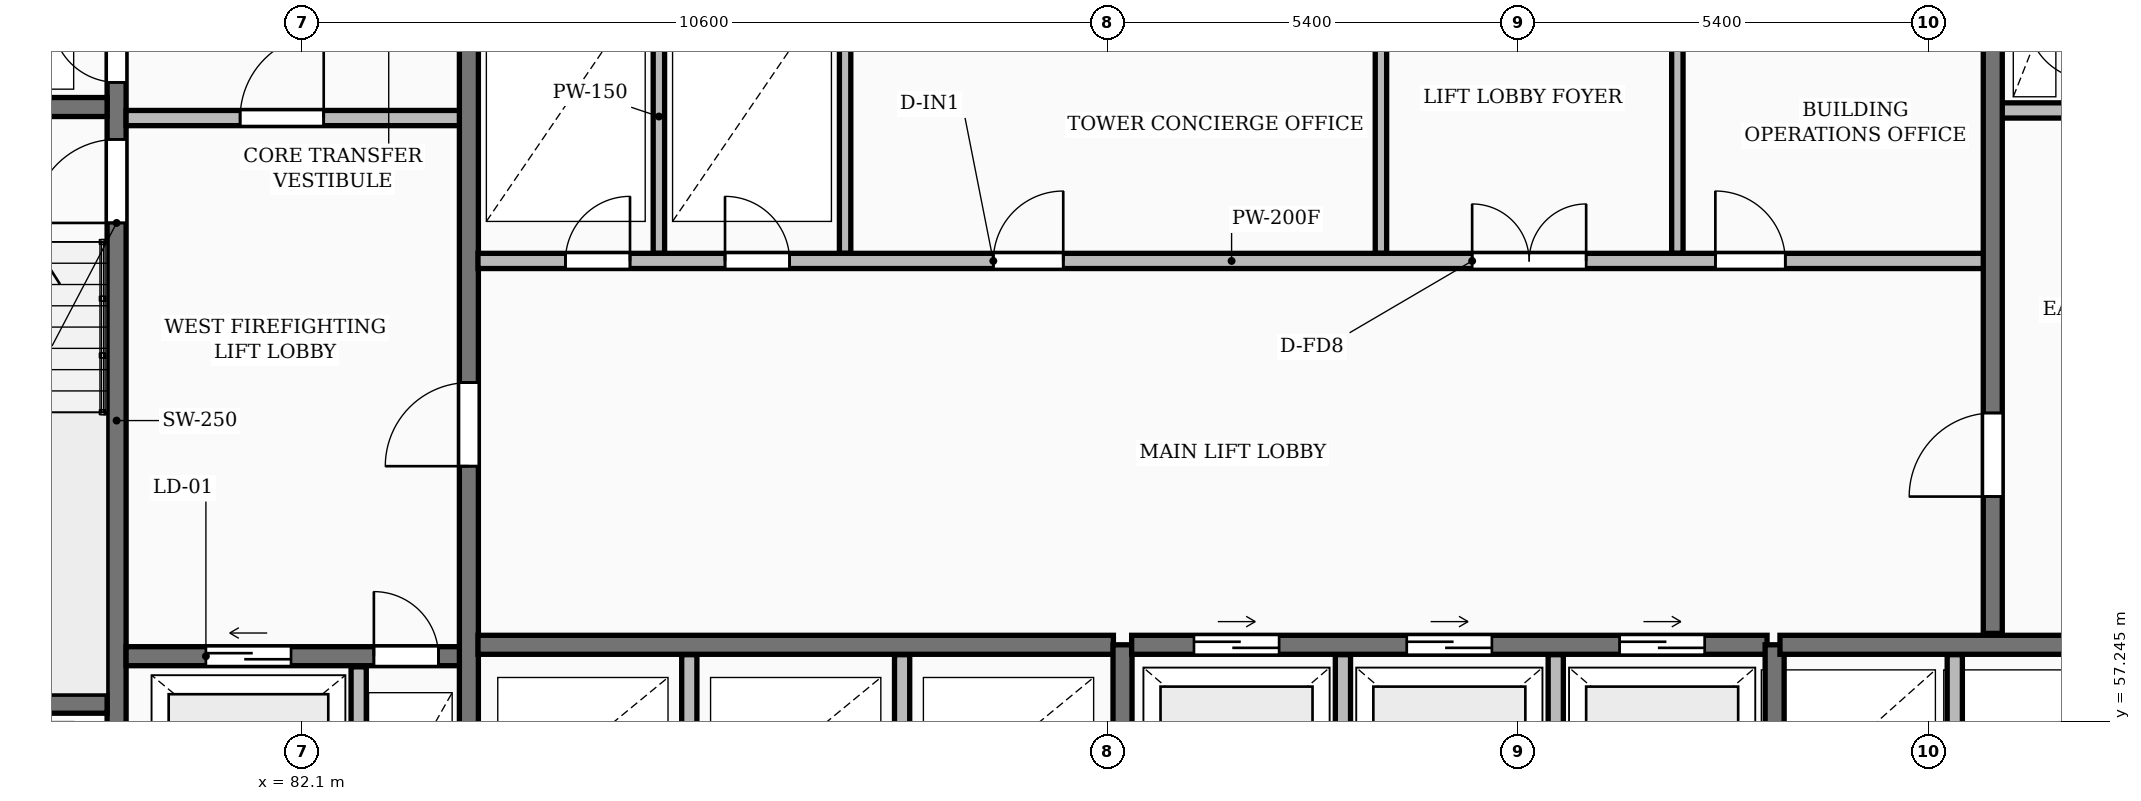
"""IFC4 building model, lengths in metres.
Left out: names, types, materials, properties, quantities, classifications, styles, units other than length and angle.
Written with IfcOpenShell. Run it as: python <this file> out.ifc"""

import sys

from ifc_helpers import new_model, si_unit, direction, frame, frame_2d, origin, place, context, subcontext, project, spatial, rectangle, extrude, element, fill, save


model = new_model("IFC4")
c1 = context("Model", 3, precision=1e-05, world=origin(), true_north=direction((0.0, 1.0)))
c2 = subcontext(c1, "Body", "Model", "MODEL_VIEW")
j1 = project(units=[si_unit("LENGTHUNIT", "METRE"), si_unit("PLANEANGLEUNIT", "RADIAN")], contexts=[c1])
p1 = place(None, origin())
s1 = spatial("IfcSite", under=j1, at=p1, CompositionType="ELEMENT")
p2 = place(p1, origin())
s2 = spatial("IfcBuilding", under=s1, at=p2, CompositionType="ELEMENT")
p3 = place(p2, frame((0.0, 0.0, 97.05)))
s3 = spatial("IfcBuildingStorey", under=s2, at=p3, CompositionType="ELEMENT", Elevation=97.05)
p4 = place(p3, frame((79.665, 55.4, 0.0), z_axis=(0.0, 0.0, 1.0), x_axis=(0.0, 1.0, 0.0)))
e1 = element("IfcWall", 1, at=p4, inside=s3, PredefinedType="SHEAR", context=c2, shape_type="SweptSolid", body=[
    extrude(rectangle(XDim=11.6, YDim=0.25, at=frame_2d((5.8, 0.0))), origin(), (0.0, 0.0, 1.0), 3.25),
])
p5 = place(p4, frame((0.55, 0.0, 0.0)))
e2 = element("IfcOpeningElement", 2, at=p5, cuts=e1, PredefinedType="OPENING", context=c2, shape_type="SweptSolid", body=[
    extrude(rectangle(XDim=0.85, YDim=2.05, at=frame_2d((0.425, 1.025))), frame((0.0, 0.135, 0.0), z_axis=(0.0, -1.0, 0.0), x_axis=(1.0, 0.0, 0.0)), (0.0, 0.0, 1.0), 0.27),
])
p6 = place(p4, frame((8.4, 0.0, 0.0)))
e3 = element("IfcOpeningElement", 3, at=p6, cuts=e1, PredefinedType="OPENING", context=c2, shape_type="SweptSolid", body=[
    extrude(rectangle(XDim=1.1, YDim=2.1, at=frame_2d((0.55, 1.05))), frame((0.0, 0.135, 0.0), z_axis=(0.0, -1.0, 0.0), x_axis=(1.0, 0.0, 0.0)), (0.0, 0.0, 1.0), 0.27),
])
p7 = place(p4, frame((10.25, 0.0, 0.0)))
e4 = element("IfcOpeningElement", 4, at=p7, cuts=e1, PredefinedType="OPENING", context=c2, shape_type="SweptSolid", body=[
    extrude(rectangle(XDim=0.85, YDim=2.05, at=frame_2d((0.425, 1.025))), frame((0.0, 0.135, 0.0), z_axis=(0.0, -1.0, 0.0), x_axis=(1.0, 0.0, 0.0)), (0.0, 0.0, 1.0), 0.27),
])
for number, where, z_axis, x_axis in (
    (5, (76.3, 57.475, 0.0), (0.0, 0.0, 1.0), (1.0, 0.0, 0.0)),
    (6, (76.3, 65.325, 0.0), (0.0, 0.0, 1.0), (1.0, 0.0, 0.0)),
):
    element("IfcWall", number, at=place(p3, frame(where, z_axis=z_axis, x_axis=x_axis)), inside=s3, PredefinedType="SHEAR", context=c2, shape_type="SweptSolid", body=[
        extrude(rectangle(XDim=3.24, YDim=0.25, at=frame_2d((1.62, 0.0))), origin(), (0.0, 0.0, 1.0), 3.25),
    ])
p8 = place(p3, frame((79.79, 58.1, 0.0), z_axis=(0.0, 0.0, 1.0), x_axis=(1.0, 0.0, 0.0)))
e7 = element("IfcWall", 7, at=p8, inside=s3, PredefinedType="SHEAR", context=c2, shape_type="SweptSolid", body=[
    extrude(rectangle(XDim=4.39, YDim=0.25, at=frame_2d((2.195, 0.0))), origin(), (0.0, 0.0, 1.0), 3.25),
])
p9 = place(p8, frame((1.05, 0.0, 0.0)))
e8 = element("IfcOpeningElement", 8, at=p9, cuts=e7, PredefinedType="OPENING", context=c2, shape_type="SweptSolid", body=[
    extrude(rectangle(XDim=1.12, YDim=2.12, at=frame_2d((0.56, 1.06))), frame((0.0, 0.135, 0.0), z_axis=(0.0, -1.0, 0.0), x_axis=(1.0, 0.0, 0.0)), (0.0, 0.0, 1.0), 0.27),
])
p10 = place(p8, frame((3.26, 0.0, 0.0)))
e9 = element("IfcOpeningElement", 9, at=p10, cuts=e7, PredefinedType="OPENING", context=c2, shape_type="SweptSolid", body=[
    extrude(rectangle(XDim=0.85, YDim=2.05, at=frame_2d((0.425, 1.025))), frame((0.0, 0.135, 0.0), z_axis=(0.0, -1.0, 0.0), x_axis=(1.0, 0.0, 0.0)), (0.0, 0.0, 1.0), 0.27),
])
p11 = place(p3, frame((82.85, 55.4, 0.0), z_axis=(0.0, 0.0, 1.0), x_axis=(0.0, 1.0, 0.0)))
e10 = element("IfcWall", 10, at=p11, inside=s3, PredefinedType="PARTITIONING", context=c2, shape_type="SweptSolid", body=[
    extrude(rectangle(XDim=2.56, YDim=0.2, at=frame_2d((1.28, 0.0))), origin(), (0.0, 0.0, 1.0), 2.97),
])
p12 = place(p3, frame((79.79, 65.18, 0.0), z_axis=(0.0, 0.0, 1.0), x_axis=(1.0, 0.0, 0.0)))
e11 = element("IfcWall", 11, at=p12, inside=s3, PredefinedType="PARTITIONING", context=c2, shape_type="SweptSolid", body=[
    extrude(rectangle(XDim=4.39, YDim=0.2, at=frame_2d((2.195, 0.0))), origin(), (0.0, 0.0, 1.0), 2.97),
])
p13 = place(p12, frame((1.5, 0.0, 0.0)))
e12 = element("IfcOpeningElement", 12, at=p13, cuts=e11, PredefinedType="OPENING", context=c2, shape_type="SweptSolid", body=[
    extrude(rectangle(XDim=1.1, YDim=2.1, at=frame_2d((0.55, 1.05))), frame((0.0, 0.11, 0.0), z_axis=(0.0, -1.0, 0.0), x_axis=(1.0, 0.0, 0.0)), (0.0, 0.0, 1.0), 0.22),
])
p14 = place(p3, frame((84.3, 55.4, 0.0), z_axis=(0.0, 0.0, 1.0), x_axis=(0.0, 1.0, 0.0)))
e13 = element("IfcWall", 13, at=p14, inside=s3, PredefinedType="SHEAR", context=c2, shape_type="SweptSolid", body=[
    extrude(rectangle(XDim=11.6, YDim=0.25, at=frame_2d((5.8, 0.0))), origin(), (0.0, 0.0, 1.0), 3.25),
])
p15 = place(p14, frame((5.2, 0.0, 0.0)))
e14 = element("IfcOpeningElement", 14, at=p15, cuts=e13, PredefinedType="OPENING", context=c2, shape_type="SweptSolid", body=[
    extrude(rectangle(XDim=1.1, YDim=2.1, at=frame_2d((0.55, 1.05))), frame((0.0, 0.135, 0.0), z_axis=(0.0, -1.0, 0.0), x_axis=(1.0, 0.0, 0.0)), (0.0, 0.0, 1.0), 0.27),
])
for number, where, z_axis, x_axis in (
    (15, (87.2, 55.4, 0.0), (0.0, 0.0, 1.0), (0.0, 1.0, 0.0)),
    (16, (90.0, 55.4, 0.0), (0.0, 0.0, 1.0), (0.0, 1.0, 0.0)),
):
    element("IfcWall", number, at=place(p3, frame(where, z_axis=z_axis, x_axis=x_axis)), inside=s3, PredefinedType="PARTITIONING", context=c2, shape_type="SweptSolid", body=[
        extrude(rectangle(XDim=2.72, YDim=0.2, at=frame_2d((1.36, 0.0))), origin(), (0.0, 0.0, 1.0), 2.97),
    ])
p16 = place(p3, frame((84.42, 58.25, 0.0), z_axis=(0.0, 0.0, 1.0), x_axis=(1.0, 0.0, 0.0)))
e17 = element("IfcWall", 17, at=p16, inside=s3, PredefinedType="SHEAR", context=c2, shape_type="SweptSolid", body=[
    extrude(rectangle(XDim=8.36, YDim=0.25, at=frame_2d((4.18, 0.0))), origin(), (0.0, 0.0, 1.0), 3.25),
])
p17 = place(p3, frame((92.9, 55.4, 0.0), z_axis=(0.0, 0.0, 1.0), x_axis=(0.0, 1.0, 0.0)))
e18 = element("IfcWall", 18, at=p17, inside=s3, PredefinedType="SHEAR", context=c2, shape_type="SweptSolid", body=[
    extrude(rectangle(XDim=2.85, YDim=0.25, at=frame_2d((1.425, 0.0))), origin(), (0.0, 0.0, 1.0), 3.25),
])
for number, where, z_axis, x_axis in (
    (19, (95.8, 55.4, 0.0), (0.0, 0.0, 1.0), (0.0, 1.0, 0.0)),
    (20, (98.6, 55.4, 0.0), (0.0, 0.0, 1.0), (0.0, 1.0, 0.0)),
):
    element("IfcWall", number, at=place(p3, frame(where, z_axis=z_axis, x_axis=x_axis)), inside=s3, PredefinedType="PARTITIONING", context=c2, shape_type="SweptSolid", body=[
        extrude(rectangle(XDim=2.72, YDim=0.2, at=frame_2d((1.36, 0.0))), origin(), (0.0, 0.0, 1.0), 2.97),
    ])
p18 = place(p3, frame((93.02, 58.25, 0.0), z_axis=(0.0, 0.0, 1.0), x_axis=(1.0, 0.0, 0.0)))
e21 = element("IfcWall", 21, at=p18, inside=s3, PredefinedType="SHEAR", context=c2, shape_type="SweptSolid", body=[
    extrude(rectangle(XDim=8.36, YDim=0.25, at=frame_2d((4.18, 0.0))), origin(), (0.0, 0.0, 1.0), 3.25),
])
p19 = place(p18, frame((0.82, 0.0, 0.0)))
e22 = element("IfcOpeningElement", 22, at=p19, cuts=e21, PredefinedType="OPENING", context=c2, shape_type="SweptSolid", body=[
    extrude(rectangle(XDim=1.12, YDim=2.12, at=frame_2d((0.56, 1.06))), frame((0.0, 0.135, 0.0), z_axis=(0.0, -1.0, 0.0), x_axis=(1.0, 0.0, 0.0)), (0.0, 0.0, 1.0), 0.27),
])
p20 = place(p18, frame((3.62, 0.0, 0.0)))
e23 = element("IfcOpeningElement", 23, at=p20, cuts=e21, PredefinedType="OPENING", context=c2, shape_type="SweptSolid", body=[
    extrude(rectangle(XDim=1.12, YDim=2.12, at=frame_2d((0.56, 1.06))), frame((0.0, 0.135, 0.0), z_axis=(0.0, -1.0, 0.0), x_axis=(1.0, 0.0, 0.0)), (0.0, 0.0, 1.0), 0.27),
])
p21 = place(p18, frame((6.42, 0.0, 0.0)))
e24 = element("IfcOpeningElement", 24, at=p21, cuts=e21, PredefinedType="OPENING", context=c2, shape_type="SweptSolid", body=[
    extrude(rectangle(XDim=1.12, YDim=2.12, at=frame_2d((0.56, 1.06))), frame((0.0, 0.135, 0.0), z_axis=(0.0, -1.0, 0.0), x_axis=(1.0, 0.0, 0.0)), (0.0, 0.0, 1.0), 0.27),
])
p22 = place(p3, frame((101.48, 55.4, 0.0), z_axis=(0.0, 0.0, 1.0), x_axis=(0.0, 1.0, 0.0)))
e25 = element("IfcWall", 25, at=p22, inside=s3, PredefinedType="SHEAR", context=c2, shape_type="SweptSolid", body=[
    extrude(rectangle(XDim=2.85, YDim=0.25, at=frame_2d((1.425, 0.0))), origin(), (0.0, 0.0, 1.0), 3.25),
])
p23 = place(p3, frame((103.85, 55.4, 0.0), z_axis=(0.0, 0.0, 1.0), x_axis=(0.0, 1.0, 0.0)))
e26 = element("IfcWall", 26, at=p23, inside=s3, PredefinedType="PARTITIONING", context=c2, shape_type="SweptSolid", body=[
    extrude(rectangle(XDim=2.72, YDim=0.2, at=frame_2d((1.36, 0.0))), origin(), (0.0, 0.0, 1.0), 2.97),
])
p24 = place(p3, frame((101.55, 58.25, 0.0), z_axis=(0.0, 0.0, 1.0), x_axis=(1.0, 0.0, 0.0)))
e27 = element("IfcWall", 27, at=p24, inside=s3, PredefinedType="SHEAR", context=c2, shape_type="SweptSolid", body=[
    extrude(rectangle(XDim=4.6, YDim=0.25, at=frame_2d((2.3, 0.0))), origin(), (0.0, 0.0, 1.0), 3.25),
])
for number, where, z_axis, x_axis in (
    (28, (86.8, 63.4, 0.0), (0.0, 0.0, 1.0), (0.0, 1.0, 0.0)),
    (29, (89.25, 63.4, 0.0), (0.0, 0.0, 1.0), (0.0, 1.0, 0.0)),
    (30, (96.3, 63.4, 0.0), (0.0, 0.0, 1.0), (0.0, 1.0, 0.0)),
    (31, (100.2, 63.4, 0.0), (0.0, 0.0, 1.0), (0.0, 1.0, 0.0)),
):
    element("IfcWall", number, at=place(p3, frame(where, z_axis=z_axis, x_axis=x_axis)), inside=s3, PredefinedType="PARTITIONING", context=c2, shape_type="SweptSolid", body=[
        extrude(rectangle(XDim=3.6, YDim=0.15, at=frame_2d((1.8, 0.0))), origin(), (0.0, 0.0, 1.0), 2.97),
    ])
p25 = place(p3, frame((84.42, 63.3, 0.0), z_axis=(0.0, 0.0, 1.0), x_axis=(1.0, 0.0, 0.0)))
e32 = element("IfcWall", 32, at=p25, inside=s3, PredefinedType="PARTITIONING", context=c2, shape_type="SweptSolid", body=[
    extrude(rectangle(XDim=19.83, YDim=0.2, at=frame_2d((9.915, 0.0))), origin(), (0.0, 0.0, 1.0), 2.97),
])
p26 = place(p25, frame((1.15, 0.0, 0.0)))
e33 = element("IfcOpeningElement", 33, at=p26, cuts=e32, PredefinedType="OPENING", context=c2, shape_type="SweptSolid", body=[
    extrude(rectangle(XDim=0.85, YDim=2.05, at=frame_2d((0.425, 1.025))), frame((0.0, 0.11, 0.0), z_axis=(0.0, -1.0, 0.0), x_axis=(1.0, 0.0, 0.0)), (0.0, 0.0, 1.0), 0.22),
])
p27 = place(p25, frame((3.25, 0.0, 0.0)))
e34 = element("IfcOpeningElement", 34, at=p27, cuts=e32, PredefinedType="OPENING", context=c2, shape_type="SweptSolid", body=[
    extrude(rectangle(XDim=0.85, YDim=2.05, at=frame_2d((0.425, 1.025))), frame((0.0, 0.11, 0.0), z_axis=(0.0, -1.0, 0.0), x_axis=(1.0, 0.0, 0.0)), (0.0, 0.0, 1.0), 0.22),
])
p28 = place(p25, frame((13.08, 0.0, 0.0)))
e35 = element("IfcOpeningElement", 35, at=p28, cuts=e32, PredefinedType="OPENING", context=c2, shape_type="SweptSolid", body=[
    extrude(rectangle(XDim=1.5, YDim=2.2, at=frame_2d((0.75, 1.1))), frame((0.0, 0.11, 0.0), z_axis=(0.0, -1.0, 0.0), x_axis=(1.0, 0.0, 0.0)), (0.0, 0.0, 1.0), 0.22),
])
p29 = place(p25, frame((6.78, 0.0, 0.0)))
e36 = element("IfcOpeningElement", 36, at=p29, cuts=e32, PredefinedType="OPENING", context=c2, shape_type="SweptSolid", body=[
    extrude(rectangle(XDim=0.92, YDim=2.08, at=frame_2d((0.46, 1.04))), frame((0.0, 0.11, 0.0), z_axis=(0.0, -1.0, 0.0), x_axis=(1.0, 0.0, 0.0)), (0.0, 0.0, 1.0), 0.22),
])
p30 = place(p25, frame((16.28, 0.0, 0.0)))
e37 = element("IfcOpeningElement", 37, at=p30, cuts=e32, PredefinedType="OPENING", context=c2, shape_type="SweptSolid", body=[
    extrude(rectangle(XDim=0.92, YDim=2.08, at=frame_2d((0.46, 1.04))), frame((0.0, 0.11, 0.0), z_axis=(0.0, -1.0, 0.0), x_axis=(1.0, 0.0, 0.0)), (0.0, 0.0, 1.0), 0.22),
])
p31 = place(p3, frame((104.45, 65.28, 0.0), z_axis=(0.0, 0.0, 1.0), x_axis=(1.0, 0.0, 0.0)))
e38 = element("IfcWall", 38, at=p31, inside=s3, PredefinedType="PARTITIONING", context=c2, shape_type="SweptSolid", body=[
    extrude(rectangle(XDim=1.2, YDim=0.2, at=frame_2d((0.6, 0.0))), origin(), (0.0, 0.0, 1.0), 2.97),
])
p32 = place(p3, frame((104.35, 58.4, 0.0), z_axis=(0.0, 0.0, 1.0), x_axis=(0.0, 1.0, 0.0)))
e39 = element("IfcWall", 39, at=p32, inside=s3, PredefinedType="SHEAR", context=c2, shape_type="SweptSolid", body=[
    extrude(rectangle(XDim=8.6, YDim=0.25, at=frame_2d((4.3, 0.0))), origin(), (0.0, 0.0, 1.0), 3.25),
])
p33 = place(p32, frame((1.8, 0.0, 0.0)))
e40 = element("IfcOpeningElement", 40, at=p33, cuts=e39, PredefinedType="OPENING", context=c2, shape_type="SweptSolid", body=[
    extrude(rectangle(XDim=1.1, YDim=2.1, at=frame_2d((0.55, 1.05))), frame((0.0, 0.135, 0.0), z_axis=(0.0, -1.0, 0.0), x_axis=(1.0, 0.0, 0.0)), (0.0, 0.0, 1.0), 0.27),
])
p34 = place(p6, origin())
e41 = element("IfcDoor", 41, at=p34, inside=s3, OperationType="SINGLE_SWING_LEFT", PredefinedType="DOOR", context=c2, shape_type="SweptSolid", body=[
    extrude(rectangle(XDim=1.1, YDim=2.1, at=frame_2d((0.55, 1.05))), frame((0.0, 0.025, 0.0), z_axis=(0.0, -1.0, 0.0), x_axis=(1.0, 0.0, 0.0)), (0.0, 0.0, 1.0), 0.05),
])
fill(e3, e41)
p35 = place(p7, origin())
e42 = element("IfcDoor", 42, at=p35, inside=s3, OperationType="SINGLE_SWING_RIGHT", PredefinedType="DOOR", context=c2, shape_type="SweptSolid", body=[
    extrude(rectangle(XDim=0.85, YDim=2.05, at=frame_2d((0.425, 1.025))), frame((0.0, 0.025, 0.0), z_axis=(0.0, -1.0, 0.0), x_axis=(1.0, 0.0, 0.0)), (0.0, 0.0, 1.0), 0.05),
])
fill(e4, e42)
p36 = place(p9, origin())
e43 = element("IfcDoor", 43, at=p36, inside=s3, OperationType="SLIDING_TO_LEFT", PredefinedType="DOOR", context=c2, shape_type="SweptSolid", body=[
    extrude(rectangle(XDim=1.12, YDim=2.12, at=frame_2d((0.56, 1.06))), frame((0.0, 0.025, 0.0), z_axis=(0.0, -1.0, 0.0), x_axis=(1.0, 0.0, 0.0)), (0.0, 0.0, 1.0), 0.05),
])
fill(e8, e43)
p37 = place(p10, origin())
e44 = element("IfcDoor", 44, at=p37, inside=s3, OperationType="SINGLE_SWING_LEFT", PredefinedType="DOOR", context=c2, shape_type="SweptSolid", body=[
    extrude(rectangle(XDim=0.85, YDim=2.05, at=frame_2d((0.425, 1.025))), frame((0.0, 0.025, 0.0), z_axis=(0.0, -1.0, 0.0), x_axis=(1.0, 0.0, 0.0)), (0.0, 0.0, 1.0), 0.05),
])
fill(e9, e44)
p38 = place(p13, origin())
e45 = element("IfcDoor", 45, at=p38, inside=s3, OperationType="SINGLE_SWING_RIGHT", PredefinedType="DOOR", context=c2, shape_type="SweptSolid", body=[
    extrude(rectangle(XDim=1.1, YDim=2.1, at=frame_2d((0.55, 1.05))), frame((0.0, 0.025, 0.0), z_axis=(0.0, -1.0, 0.0), x_axis=(1.0, 0.0, 0.0)), (0.0, 0.0, 1.0), 0.05),
])
fill(e12, e45)
p39 = place(p15, origin())
e46 = element("IfcDoor", 46, at=p39, inside=s3, OperationType="SINGLE_SWING_LEFT", PredefinedType="DOOR", context=c2, shape_type="SweptSolid", body=[
    extrude(rectangle(XDim=1.1, YDim=2.1, at=frame_2d((0.55, 1.05))), frame((0.0, 0.025, 0.0), z_axis=(0.0, -1.0, 0.0), x_axis=(1.0, 0.0, 0.0)), (0.0, 0.0, 1.0), 0.05),
])
fill(e14, e46)
p40 = place(p19, origin())
e47 = element("IfcDoor", 47, at=p40, inside=s3, OperationType="SLIDING_TO_RIGHT", PredefinedType="DOOR", context=c2, shape_type="SweptSolid", body=[
    extrude(rectangle(XDim=1.12, YDim=2.12, at=frame_2d((0.56, 1.06))), frame((0.0, 0.025, 0.0), z_axis=(0.0, -1.0, 0.0), x_axis=(1.0, 0.0, 0.0)), (0.0, 0.0, 1.0), 0.05),
])
fill(e22, e47)
p41 = place(p20, origin())
e48 = element("IfcDoor", 48, at=p41, inside=s3, OperationType="SLIDING_TO_RIGHT", PredefinedType="DOOR", context=c2, shape_type="SweptSolid", body=[
    extrude(rectangle(XDim=1.12, YDim=2.12, at=frame_2d((0.56, 1.06))), frame((0.0, 0.025, 0.0), z_axis=(0.0, -1.0, 0.0), x_axis=(1.0, 0.0, 0.0)), (0.0, 0.0, 1.0), 0.05),
])
fill(e23, e48)
p42 = place(p21, origin())
e49 = element("IfcDoor", 49, at=p42, inside=s3, OperationType="SLIDING_TO_RIGHT", PredefinedType="DOOR", context=c2, shape_type="SweptSolid", body=[
    extrude(rectangle(XDim=1.12, YDim=2.12, at=frame_2d((0.56, 1.06))), frame((0.0, 0.025, 0.0), z_axis=(0.0, -1.0, 0.0), x_axis=(1.0, 0.0, 0.0)), (0.0, 0.0, 1.0), 0.05),
])
fill(e24, e49)
p43 = place(p26, origin())
e50 = element("IfcDoor", 50, at=p43, inside=s3, OperationType="SINGLE_SWING_RIGHT", PredefinedType="DOOR", context=c2, shape_type="SweptSolid", body=[
    extrude(rectangle(XDim=0.85, YDim=2.05, at=frame_2d((0.425, 1.025))), frame((0.0, 0.025, 0.0), z_axis=(0.0, -1.0, 0.0), x_axis=(1.0, 0.0, 0.0)), (0.0, 0.0, 1.0), 0.05),
])
fill(e33, e50)
p44 = place(p27, origin())
e51 = element("IfcDoor", 51, at=p44, inside=s3, OperationType="SINGLE_SWING_LEFT", PredefinedType="DOOR", context=c2, shape_type="SweptSolid", body=[
    extrude(rectangle(XDim=0.85, YDim=2.05, at=frame_2d((0.425, 1.025))), frame((0.0, 0.025, 0.0), z_axis=(0.0, -1.0, 0.0), x_axis=(1.0, 0.0, 0.0)), (0.0, 0.0, 1.0), 0.05),
])
fill(e34, e51)
p45 = place(p28, origin())
e52 = element("IfcDoor", 52, at=p45, inside=s3, OperationType="DOUBLE_DOOR_SINGLE_SWING", PredefinedType="DOOR", context=c2, shape_type="SweptSolid", body=[
    extrude(rectangle(XDim=1.5, YDim=2.2, at=frame_2d((0.75, 1.1))), frame((0.0, 0.025, 0.0), z_axis=(0.0, -1.0, 0.0), x_axis=(1.0, 0.0, 0.0)), (0.0, 0.0, 1.0), 0.05),
])
fill(e35, e52)
p46 = place(p29, origin())
e53 = element("IfcDoor", 53, at=p46, inside=s3, OperationType="SINGLE_SWING_RIGHT", PredefinedType="DOOR", context=c2, shape_type="SweptSolid", body=[
    extrude(rectangle(XDim=0.92, YDim=2.08, at=frame_2d((0.46, 1.04))), frame((0.0, 0.025, 0.0), z_axis=(0.0, -1.0, 0.0), x_axis=(1.0, 0.0, 0.0)), (0.0, 0.0, 1.0), 0.05),
])
fill(e36, e53)
p47 = place(p30, origin())
e54 = element("IfcDoor", 54, at=p47, inside=s3, OperationType="SINGLE_SWING_LEFT", PredefinedType="DOOR", context=c2, shape_type="SweptSolid", body=[
    extrude(rectangle(XDim=0.92, YDim=2.08, at=frame_2d((0.46, 1.04))), frame((0.0, 0.025, 0.0), z_axis=(0.0, -1.0, 0.0), x_axis=(1.0, 0.0, 0.0)), (0.0, 0.0, 1.0), 0.05),
])
fill(e37, e54)
p48 = place(p33, origin())
e55 = element("IfcDoor", 55, at=p48, inside=s3, OperationType="SINGLE_SWING_LEFT", PredefinedType="DOOR", context=c2, shape_type="SweptSolid", body=[
    extrude(rectangle(XDim=1.1, YDim=2.1, at=frame_2d((0.55, 1.05))), frame((0.0, 0.025, 0.0), z_axis=(0.0, -1.0, 0.0), x_axis=(1.0, 0.0, 0.0)), (0.0, 0.0, 1.0), 0.05),
])
fill(e40, e55)
save(model, sys.argv[1])
